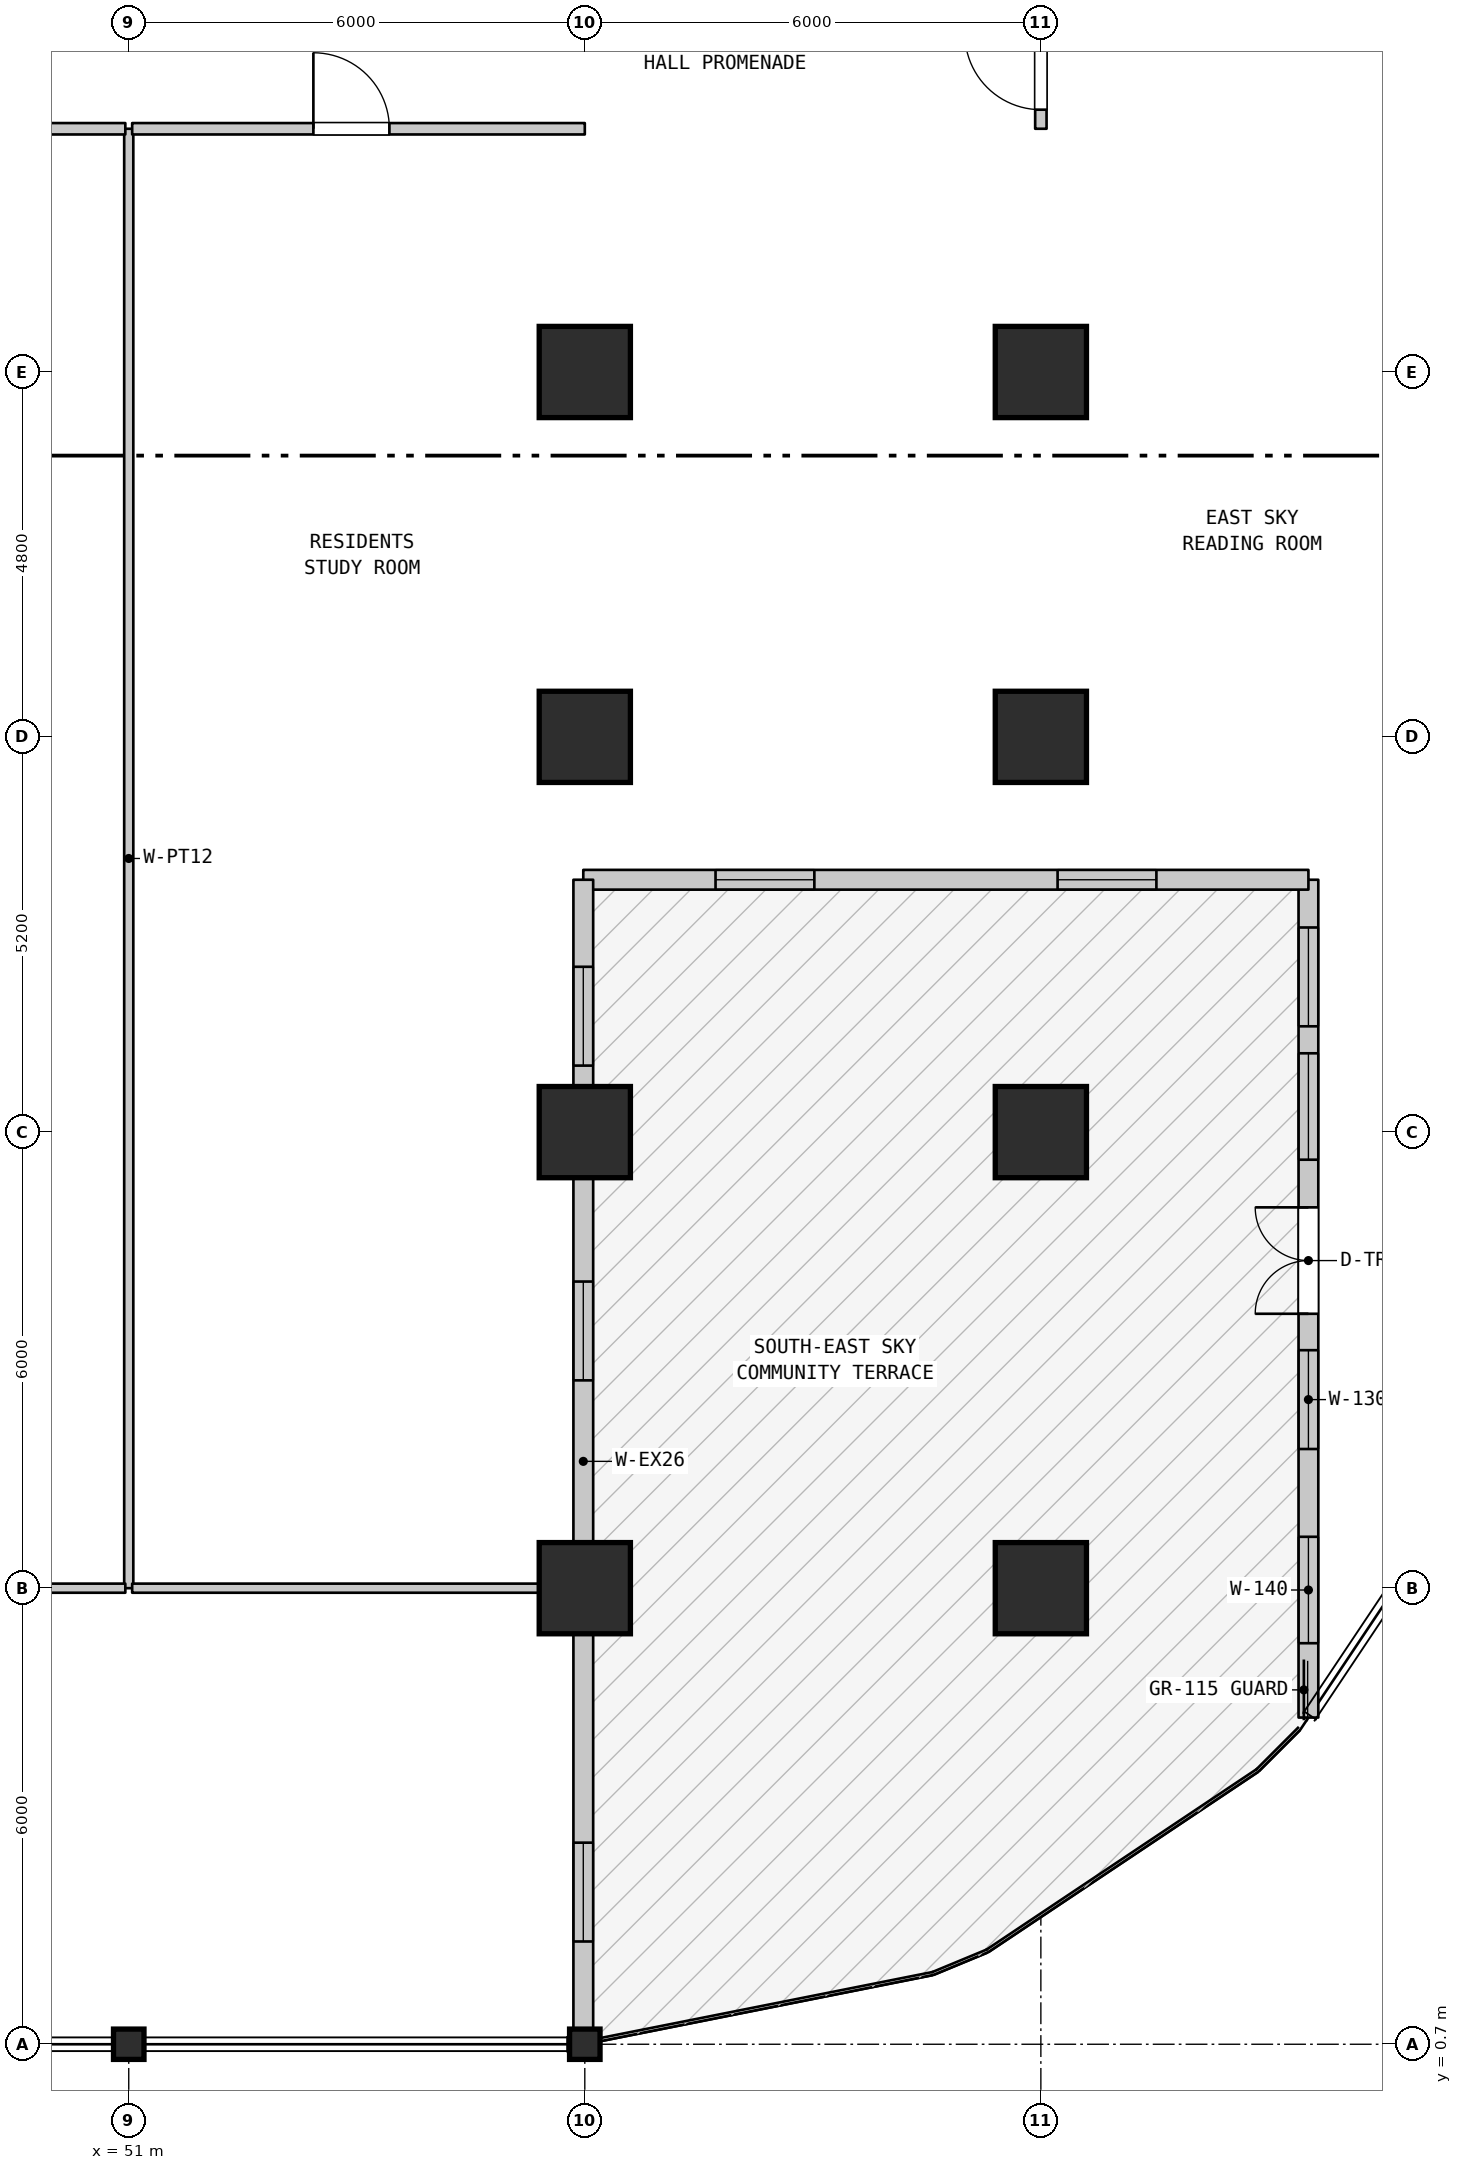
"""IFC4 building model, lengths in metres.
Left out: names, types, materials, properties, quantities, classifications, styles, units other than length and angle.
Written with IfcOpenShell. Run it as: python <this file> out.ifc"""

import sys

from ifc_helpers import new_model, si_unit, direction, frame, frame_2d, origin, origin_2d, place, context, subcontext, project, spatial, rectangle, i_section, extrude, element, fill, save


model = new_model("IFC4")
c1 = context("Model", 3, precision=1e-05, world=origin(), true_north=direction((0.0, 1.0)))
c2 = subcontext(c1, "Body", "Model", "MODEL_VIEW")
j1 = project(units=[si_unit("LENGTHUNIT", "METRE"), si_unit("PLANEANGLEUNIT", "RADIAN")], contexts=[c1])
p1 = place(None, origin())
s1 = spatial("IfcSite", under=j1, at=p1, CompositionType="ELEMENT")
p2 = place(p1, origin())
s2 = spatial("IfcBuilding", under=s1, at=p2, CompositionType="ELEMENT")
p3 = place(p2, frame((0.0, 0.0, 65.6)))
s3 = spatial("IfcBuildingStorey", under=s2, at=p3, CompositionType="ELEMENT", Elevation=65.6)
for number, where, z_axis, x_axis in (
    (1, (51.0, 0.7, 0.0), (0.0, 0.0, 1.0), (1.0, 0.0, 0.0)),
    (2, (57.0, 0.7, 0.0), (0.0, 0.0, 1.0), (1.0, 0.0, 0.0)),
):
    element("IfcColumn", number, at=place(p3, frame(where, z_axis=z_axis, x_axis=x_axis)), inside=s3, PredefinedType="COLUMN", context=c2, shape_type="SweptSolid", body=[
        extrude(i_section(OverallWidth=0.401, OverallDepth=0.399, WebThickness=0.025, FlangeThickness=0.04, FilletRadius=0.015, at=origin_2d()), origin(), (0.0, 0.0, 1.0), 4.5),
    ])
for number, where, z_axis, x_axis in (
    (3, (57.0, 6.7, 0.0), (0.0, 0.0, 1.0), (1.0, 0.0, 0.0)),
    (4, (57.0, 12.7, 0.0), (0.0, 0.0, 1.0), (1.0, 0.0, 0.0)),
    (5, (57.0, 17.9, 0.0), (0.0, 0.0, 1.0), (1.0, 0.0, 0.0)),
    (6, (57.0, 22.7, 0.0), (0.0, 0.0, 1.0), (1.0, 0.0, 0.0)),
    (7, (63.0, 6.7, 0.0), (0.0, 0.0, 1.0), (1.0, 0.0, 0.0)),
    (8, (63.0, 12.7, 0.0), (0.0, 0.0, 1.0), (1.0, 0.0, 0.0)),
    (9, (63.0, 17.9, 0.0), (0.0, 0.0, 1.0), (1.0, 0.0, 0.0)),
    (10, (63.0, 22.7, 0.0), (0.0, 0.0, 1.0), (1.0, 0.0, 0.0)),
):
    element("IfcColumn", number, at=place(p3, frame(where, z_axis=z_axis, x_axis=x_axis)), inside=s3, PredefinedType="COLUMN", context=c2, shape_type="SweptSolid", body=[
        extrude(rectangle(XDim=1.2, YDim=1.2, at=origin_2d()), origin(), (0.0, 0.0, 1.0), 4.5),
    ])
p4 = place(p3, frame((66.52, 4.998, 0.0), z_axis=(0.0, 0.0, 1.0), x_axis=(0.0, 1.0, 0.0)))
e11 = element("IfcWall", 11, at=p4, inside=s3, PredefinedType="STANDARD", context=c2, shape_type="SweptSolid", body=[
    extrude(rectangle(XDim=11.022, YDim=0.26, at=frame_2d((5.511, 0.0))), origin(), (0.0, 0.0, 1.0), 4.185),
])
p5 = place(p4, frame((5.312, 0.0, 0.0)))
e12 = element("IfcOpeningElement", 12, at=p5, cuts=e11, PredefinedType="OPENING", context=c2, shape_type="SweptSolid", body=[
    extrude(rectangle(XDim=1.4, YDim=2.2, at=frame_2d((0.7, 1.1))), frame((0.0, 0.14, 0.0), z_axis=(0.0, -1.0, 0.0), x_axis=(1.0, 0.0, 0.0)), (0.0, 0.0, 1.0), 0.28),
])
p6 = place(p4, frame((0.978, 0.0, 0.9)))
e13 = element("IfcOpeningElement", 13, at=p6, cuts=e11, PredefinedType="OPENING", context=c2, shape_type="SweptSolid", body=[
    extrude(rectangle(XDim=1.4, YDim=1.85, at=frame_2d((0.7, 0.925))), frame((0.0, 0.14, 0.0), z_axis=(0.0, -1.0, 0.0), x_axis=(1.0, 0.0, 0.0)), (0.0, 0.0, 1.0), 0.28),
])
p7 = place(p4, frame((3.533, 0.0, 0.9)))
e14 = element("IfcOpeningElement", 14, at=p7, cuts=e11, PredefinedType="OPENING", context=c2, shape_type="SweptSolid", body=[
    extrude(rectangle(XDim=1.3, YDim=1.9, at=frame_2d((0.65, 0.95))), frame((0.0, 0.14, 0.0), z_axis=(0.0, -1.0, 0.0), x_axis=(1.0, 0.0, 0.0)), (0.0, 0.0, 1.0), 0.28),
])
p8 = place(p4, frame((7.339, 0.0, 0.9)))
e15 = element("IfcOpeningElement", 15, at=p8, cuts=e11, PredefinedType="OPENING", context=c2, shape_type="SweptSolid", body=[
    extrude(rectangle(XDim=1.4, YDim=1.85, at=frame_2d((0.7, 0.925))), frame((0.0, 0.14, 0.0), z_axis=(0.0, -1.0, 0.0), x_axis=(1.0, 0.0, 0.0)), (0.0, 0.0, 1.0), 0.28),
])
p9 = place(p4, frame((9.094, 0.0, 0.9)))
e16 = element("IfcOpeningElement", 16, at=p9, cuts=e11, PredefinedType="OPENING", context=c2, shape_type="SweptSolid", body=[
    extrude(rectangle(XDim=1.3, YDim=1.9, at=frame_2d((0.65, 0.95))), frame((0.0, 0.14, 0.0), z_axis=(0.0, -1.0, 0.0), x_axis=(1.0, 0.0, 0.0)), (0.0, 0.0, 1.0), 0.28),
])
p10 = place(p3, frame((66.52, 16.02, 0.0), z_axis=(0.0, 0.0, 1.0), x_axis=(-1.0, 0.0, 0.0)))
e17 = element("IfcWall", 17, at=p10, inside=s3, PredefinedType="STANDARD", context=c2, shape_type="SweptSolid", body=[
    extrude(rectangle(XDim=9.54, YDim=0.26, at=frame_2d((4.77, 0.0))), origin(), (0.0, 0.0, 1.0), 4.185),
])
p11 = place(p10, frame((2.0, 0.0, 0.85)))
e18 = element("IfcOpeningElement", 18, at=p11, cuts=e17, PredefinedType="OPENING", context=c2, shape_type="SweptSolid", body=[
    extrude(rectangle(XDim=1.3, YDim=1.9, at=frame_2d((0.65, 0.95))), frame((0.0, 0.14, 0.0), z_axis=(0.0, -1.0, 0.0), x_axis=(1.0, 0.0, 0.0)), (0.0, 0.0, 1.0), 0.28),
])
p12 = place(p10, frame((6.5, 0.0, 0.85)))
e19 = element("IfcOpeningElement", 19, at=p12, cuts=e17, PredefinedType="OPENING", context=c2, shape_type="SweptSolid", body=[
    extrude(rectangle(XDim=1.3, YDim=1.9, at=frame_2d((0.65, 0.95))), frame((0.0, 0.14, 0.0), z_axis=(0.0, -1.0, 0.0), x_axis=(1.0, 0.0, 0.0)), (0.0, 0.0, 1.0), 0.28),
])
p13 = place(p3, frame((56.98, 16.02, 0.0), z_axis=(0.0, 0.0, 1.0), x_axis=(0.0, -1.0, 0.0)))
e20 = element("IfcWall", 20, at=p13, inside=s3, PredefinedType="STANDARD", context=c2, shape_type="SweptSolid", body=[
    extrude(rectangle(XDim=15.303, YDim=0.26, at=frame_2d((7.651, 0.0))), origin(), (0.0, 0.0, 1.0), 3.685),
])
p14 = place(p13, frame((1.145, 0.0, 0.85)))
e21 = element("IfcOpeningElement", 21, at=p14, cuts=e20, PredefinedType="OPENING", context=c2, shape_type="SweptSolid", body=[
    extrude(rectangle(XDim=1.3, YDim=1.9, at=frame_2d((0.65, 0.95))), frame((0.0, 0.14, 0.0), z_axis=(0.0, -1.0, 0.0), x_axis=(1.0, 0.0, 0.0)), (0.0, 0.0, 1.0), 0.28),
])
p15 = place(p13, frame((5.286, 0.0, 0.85)))
e22 = element("IfcOpeningElement", 22, at=p15, cuts=e20, PredefinedType="OPENING", context=c2, shape_type="SweptSolid", body=[
    extrude(rectangle(XDim=1.3, YDim=1.9, at=frame_2d((0.65, 0.95))), frame((0.0, 0.14, 0.0), z_axis=(0.0, -1.0, 0.0), x_axis=(1.0, 0.0, 0.0)), (0.0, 0.0, 1.0), 0.28),
])
p16 = place(p13, frame((12.668, 0.0, 0.85)))
e23 = element("IfcOpeningElement", 23, at=p16, cuts=e20, PredefinedType="OPENING", context=c2, shape_type="SweptSolid", body=[
    extrude(rectangle(XDim=1.3, YDim=1.9, at=frame_2d((0.65, 0.95))), frame((0.0, 0.14, 0.0), z_axis=(0.0, -1.0, 0.0), x_axis=(1.0, 0.0, 0.0)), (0.0, 0.0, 1.0), 0.28),
])
p17 = place(p3, frame((51.0, 6.7, 0.0), z_axis=(0.0, 0.0, 1.0), x_axis=(0.0, 1.0, 0.0)))
e24 = element("IfcWall", 24, at=p17, inside=s3, PredefinedType="PARTITIONING", context=c2, shape_type="SweptSolid", body=[
    extrude(rectangle(XDim=19.2, YDim=0.12, at=frame_2d((9.6, 0.0))), origin(), (0.0, 0.0, 1.0), 4.185),
])
p18 = place(p3, frame((63.0, 25.9, 0.0), z_axis=(0.0, 0.0, 1.0), x_axis=(0.0, 1.0, 0.0)))
e25 = element("IfcWall", 25, at=p18, inside=s3, PredefinedType="STANDARD", context=c2, shape_type="SweptSolid", body=[
    extrude(rectangle(XDim=2.0, YDim=0.15, at=frame_2d((1.0, 0.0))), origin(), (0.0, 0.0, 1.0), 3.685),
])
p19 = place(p18, frame((0.251, 0.0, 0.0)))
e26 = element("IfcOpeningElement", 26, at=p19, cuts=e25, PredefinedType="OPENING", context=c2, shape_type="SweptSolid", body=[
    extrude(rectangle(XDim=1.0, YDim=2.15, at=frame_2d((0.5, 1.075))), frame((0.0, 0.085, 0.0), z_axis=(0.0, -1.0, 0.0), x_axis=(1.0, 0.0, 0.0)), (0.0, 0.0, 1.0), 0.17),
])
p20 = place(p3, frame((51.045, 6.7, 0.0), z_axis=(0.0, 0.0, 1.0), x_axis=(1.0, 0.0, 0.0)))
e27 = element("IfcWall", 27, at=p20, inside=s3, PredefinedType="PARTITIONING", context=c2, shape_type="SweptSolid", body=[
    extrude(rectangle(XDim=5.925, YDim=0.12, at=frame_2d((2.962, 0.0))), origin(), (0.0, 0.0, 1.0), 3.585),
])
p21 = place(p3, frame((33.06, 25.9, 0.0), z_axis=(0.0, 0.0, 1.0), x_axis=(1.0, 0.0, 0.0)))
e28 = element("IfcWall", 28, at=p21, inside=s3, PredefinedType="STANDARD", context=c2, shape_type="SweptSolid", body=[
    extrude(rectangle(XDim=17.895, YDim=0.15, at=frame_2d((8.948, 0.0))), origin(), (0.0, 0.0, 1.0), 4.185),
])
p22 = place(p21, frame((8.369, 0.0, 0.0)))
e29 = element("IfcOpeningElement", 29, at=p22, cuts=e28, PredefinedType="OPENING", context=c2, shape_type="SweptSolid", body=[
    extrude(rectangle(XDim=1.0, YDim=2.15, at=frame_2d((0.5, 1.075))), frame((0.0, 0.085, 0.0), z_axis=(0.0, -1.0, 0.0), x_axis=(1.0, 0.0, 0.0)), (0.0, 0.0, 1.0), 0.17),
])
p23 = place(p3, frame((51.045, 25.9, 0.0), z_axis=(0.0, 0.0, 1.0), x_axis=(1.0, 0.0, 0.0)))
e30 = element("IfcWall", 30, at=p23, inside=s3, PredefinedType="STANDARD", context=c2, shape_type="SweptSolid", body=[
    extrude(rectangle(XDim=5.955, YDim=0.15, at=frame_2d((2.978, 0.0))), origin(), (0.0, 0.0, 1.0), 4.185),
])
p24 = place(p23, frame((2.384, 0.0, 0.0)))
e31 = element("IfcOpeningElement", 31, at=p24, cuts=e30, PredefinedType="OPENING", context=c2, shape_type="SweptSolid", body=[
    extrude(rectangle(XDim=1.0, YDim=2.15, at=frame_2d((0.5, 1.075))), frame((0.0, 0.085, 0.0), z_axis=(0.0, -1.0, 0.0), x_axis=(1.0, 0.0, 0.0)), (0.0, 0.0, 1.0), 0.17),
])
p25 = place(p3, frame((39.0, 6.7, 0.0), z_axis=(0.0, 0.0, 1.0), x_axis=(1.0, 0.0, 0.0)))
e32 = element("IfcWall", 32, at=p25, inside=s3, PredefinedType="PARTITIONING", context=c2, shape_type="SweptSolid", body=[
    extrude(rectangle(XDim=11.955, YDim=0.12, at=frame_2d((5.978, 0.0))), origin(), (0.0, 0.0, 1.0), 3.585),
])
p26 = place(p5, origin())
e33 = element("IfcDoor", 33, at=p26, inside=s3, OperationType="DOUBLE_DOOR_SINGLE_SWING", PredefinedType="DOOR", context=c2, shape_type="SweptSolid", body=[
    extrude(rectangle(XDim=1.4, YDim=2.2, at=frame_2d((0.7, 1.1))), frame((0.0, 0.025, 0.0), z_axis=(0.0, -1.0, 0.0), x_axis=(1.0, 0.0, 0.0)), (0.0, 0.0, 1.0), 0.05),
])
fill(e12, e33)
p27 = place(p6, origin())
e34 = element("IfcWindow", 34, at=p27, inside=s3, PartitioningType="SINGLE_PANEL", PredefinedType="WINDOW", context=c2, shape_type="SweptSolid", body=[
    extrude(rectangle(XDim=1.4, YDim=1.85, at=frame_2d((0.7, 0.925))), frame((0.0, 0.03, 0.0), z_axis=(0.0, -1.0, 0.0), x_axis=(1.0, 0.0, 0.0)), (0.0, 0.0, 1.0), 0.06),
])
fill(e13, e34)
p28 = place(p7, origin())
e35 = element("IfcWindow", 35, at=p28, inside=s3, PartitioningType="SINGLE_PANEL", PredefinedType="WINDOW", context=c2, shape_type="SweptSolid", body=[
    extrude(rectangle(XDim=1.3, YDim=1.9, at=frame_2d((0.65, 0.95))), frame((0.0, 0.03, 0.0), z_axis=(0.0, -1.0, 0.0), x_axis=(1.0, 0.0, 0.0)), (0.0, 0.0, 1.0), 0.06),
])
fill(e14, e35)
p29 = place(p8, origin())
e36 = element("IfcWindow", 36, at=p29, inside=s3, PartitioningType="SINGLE_PANEL", PredefinedType="WINDOW", context=c2, shape_type="SweptSolid", body=[
    extrude(rectangle(XDim=1.4, YDim=1.85, at=frame_2d((0.7, 0.925))), frame((0.0, 0.03, 0.0), z_axis=(0.0, -1.0, 0.0), x_axis=(1.0, 0.0, 0.0)), (0.0, 0.0, 1.0), 0.06),
])
fill(e15, e36)
p30 = place(p9, origin())
e37 = element("IfcWindow", 37, at=p30, inside=s3, PartitioningType="SINGLE_PANEL", PredefinedType="WINDOW", context=c2, shape_type="SweptSolid", body=[
    extrude(rectangle(XDim=1.3, YDim=1.9, at=frame_2d((0.65, 0.95))), frame((0.0, 0.03, 0.0), z_axis=(0.0, -1.0, 0.0), x_axis=(1.0, 0.0, 0.0)), (0.0, 0.0, 1.0), 0.06),
])
fill(e16, e37)
p31 = place(p11, origin())
e38 = element("IfcWindow", 38, at=p31, inside=s3, PartitioningType="SINGLE_PANEL", PredefinedType="WINDOW", context=c2, shape_type="SweptSolid", body=[
    extrude(rectangle(XDim=1.3, YDim=1.9, at=frame_2d((0.65, 0.95))), frame((0.0, 0.03, 0.0), z_axis=(0.0, -1.0, 0.0), x_axis=(1.0, 0.0, 0.0)), (0.0, 0.0, 1.0), 0.06),
])
fill(e18, e38)
p32 = place(p12, origin())
e39 = element("IfcWindow", 39, at=p32, inside=s3, PartitioningType="SINGLE_PANEL", PredefinedType="WINDOW", context=c2, shape_type="SweptSolid", body=[
    extrude(rectangle(XDim=1.3, YDim=1.9, at=frame_2d((0.65, 0.95))), frame((0.0, 0.03, 0.0), z_axis=(0.0, -1.0, 0.0), x_axis=(1.0, 0.0, 0.0)), (0.0, 0.0, 1.0), 0.06),
])
fill(e19, e39)
p33 = place(p14, origin())
e40 = element("IfcWindow", 40, at=p33, inside=s3, PartitioningType="SINGLE_PANEL", PredefinedType="WINDOW", context=c2, shape_type="SweptSolid", body=[
    extrude(rectangle(XDim=1.3, YDim=1.9, at=frame_2d((0.65, 0.95))), frame((0.0, 0.03, 0.0), z_axis=(0.0, -1.0, 0.0), x_axis=(1.0, 0.0, 0.0)), (0.0, 0.0, 1.0), 0.06),
])
fill(e21, e40)
p34 = place(p15, origin())
e41 = element("IfcWindow", 41, at=p34, inside=s3, PartitioningType="SINGLE_PANEL", PredefinedType="WINDOW", context=c2, shape_type="SweptSolid", body=[
    extrude(rectangle(XDim=1.3, YDim=1.9, at=frame_2d((0.65, 0.95))), frame((0.0, 0.03, 0.0), z_axis=(0.0, -1.0, 0.0), x_axis=(1.0, 0.0, 0.0)), (0.0, 0.0, 1.0), 0.06),
])
fill(e22, e41)
p35 = place(p16, origin())
e42 = element("IfcWindow", 42, at=p35, inside=s3, PartitioningType="SINGLE_PANEL", PredefinedType="WINDOW", context=c2, shape_type="SweptSolid", body=[
    extrude(rectangle(XDim=1.3, YDim=1.9, at=frame_2d((0.65, 0.95))), frame((0.0, 0.03, 0.0), z_axis=(0.0, -1.0, 0.0), x_axis=(1.0, 0.0, 0.0)), (0.0, 0.0, 1.0), 0.06),
])
fill(e23, e42)
p36 = place(p19, origin())
e43 = element("IfcDoor", 43, at=p36, inside=s3, OperationType="SINGLE_SWING_RIGHT", PredefinedType="DOOR", context=c2, shape_type="SweptSolid", body=[
    extrude(rectangle(XDim=1.0, YDim=2.15, at=frame_2d((0.5, 1.075))), frame((0.0, 0.025, 0.0), z_axis=(0.0, -1.0, 0.0), x_axis=(1.0, 0.0, 0.0)), (0.0, 0.0, 1.0), 0.05),
])
fill(e26, e43)
p37 = place(p24, origin())
e44 = element("IfcDoor", 44, at=p37, inside=s3, OperationType="SINGLE_SWING_LEFT", PredefinedType="DOOR", context=c2, shape_type="SweptSolid", body=[
    extrude(rectangle(XDim=1.0, YDim=2.15, at=frame_2d((0.5, 1.075))), frame((0.0, 0.025, 0.0), z_axis=(0.0, -1.0, 0.0), x_axis=(1.0, 0.0, 0.0)), (0.0, 0.0, 1.0), 0.05),
])
fill(e31, e44)
save(model, sys.argv[1])
